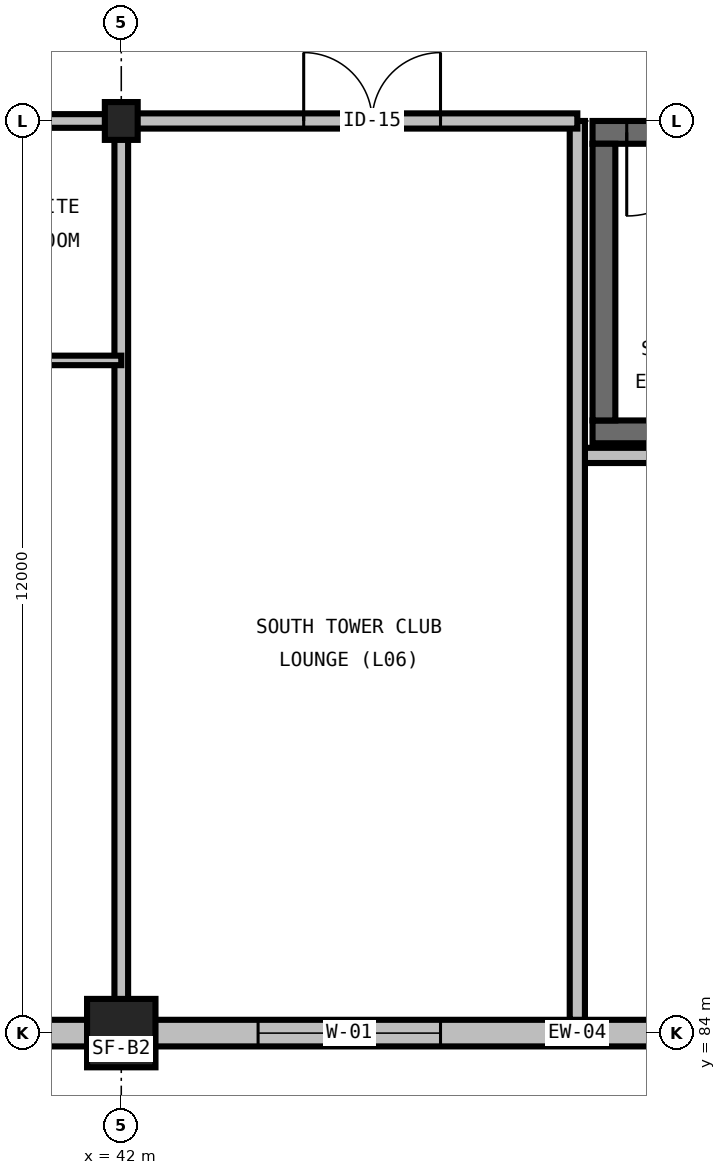
"""IFC4 building model, lengths in metres.
Left out: names, types, materials, properties, quantities, classifications, styles, units other than length and angle.
Written with IfcOpenShell. Run it as: python <this file> out.ifc"""

import sys

from ifc_helpers import new_model, si_unit, direction, frame, frame_2d, origin, origin_2d, place, context, subcontext, project, spatial, rectangle, i_section, extrude, element, fill, save


model = new_model("IFC4")
c1 = context("Model", 3, precision=1e-05, world=origin(), true_north=direction((0.0, 1.0)))
c2 = subcontext(c1, "Body", "Model", "MODEL_VIEW")
j1 = project(units=[si_unit("LENGTHUNIT", "METRE"), si_unit("PLANEANGLEUNIT", "RADIAN")], contexts=[c1])
p1 = place(None, origin())
s1 = spatial("IfcSite", under=j1, at=p1, CompositionType="ELEMENT")
p2 = place(p1, origin())
s2 = spatial("IfcBuilding", under=s1, at=p2, CompositionType="ELEMENT")
p3 = place(p2, frame((0.0, 0.0, 31.2)))
s3 = spatial("IfcBuildingStorey", under=s2, at=p3, CompositionType="ELEMENT", Elevation=31.2)
p4 = place(p3, frame((42.0, 84.0, 0.0), z_axis=(0.0, 0.0, 1.0), x_axis=(1.0, 0.0, 0.0)))
e1 = element("IfcColumn", 1, at=p4, inside=s3, PredefinedType="COLUMN", context=c2, shape_type="SweptSolid", body=[
    extrude(rectangle(XDim=0.9, YDim=0.9, at=origin_2d()), origin(), (0.0, 0.0, 1.0), 3.6),
])
p5 = place(p3, frame((42.0, 96.0, 0.0), z_axis=(0.0, 0.0, 1.0), x_axis=(1.0, 0.0, 0.0)))
e2 = element("IfcColumn", 2, at=p5, inside=s3, PredefinedType="COLUMN", context=c2, shape_type="SweptSolid", body=[
    extrude(i_section(OverallWidth=0.432, OverallDepth=0.498, WebThickness=0.056, FlangeThickness=0.089, FilletRadius=0.031, at=origin_2d()), origin(), (0.0, 0.0, 1.0), 3.6),
])
p6 = place(p3, frame((48.2, 91.91, 0.0), z_axis=(0.0, 0.0, 1.0), x_axis=(1.0, 0.0, 0.0)))
e3 = element("IfcWall", 3, at=p6, inside=s3, PredefinedType="SHEAR", context=c2, shape_type="SweptSolid", body=[
    extrude(rectangle(XDim=9.8, YDim=0.3, at=frame_2d((4.9, 0.0))), origin(), (0.0, 0.0, 1.0), 3.6),
])
p7 = place(p3, frame((58.0, 95.85, 0.0), z_axis=(0.0, 0.0, 1.0), x_axis=(-1.0, 0.0, 0.0)))
e4 = element("IfcWall", 4, at=p7, inside=s3, PredefinedType="SHEAR", context=c2, shape_type="SweptSolid", body=[
    extrude(rectangle(XDim=9.8, YDim=0.3, at=frame_2d((4.9, 0.0))), origin(), (0.0, 0.0, 1.0), 3.6),
])
p8 = place(p7, frame((8.25, 0.0, 0.0)))
e5 = element("IfcOpeningElement", 5, at=p8, cuts=e4, PredefinedType="OPENING", context=c2, shape_type="SweptSolid", body=[
    extrude(rectangle(XDim=1.1, YDim=2.2, at=frame_2d((0.55, 1.1))), frame((0.0, 0.165, 0.0), z_axis=(0.0, -1.0, 0.0), x_axis=(1.0, 0.0, 0.0)), (0.0, 0.0, 1.0), 0.33),
])
p9 = place(p3, frame((48.35, 95.7, 0.0), z_axis=(0.0, 0.0, 1.0), x_axis=(0.0, -1.0, 0.0)))
e6 = element("IfcWall", 6, at=p9, inside=s3, PredefinedType="SHEAR", context=c2, shape_type="SweptSolid", body=[
    extrude(rectangle(XDim=3.64, YDim=0.3, at=frame_2d((1.82, 0.0))), origin(), (0.0, 0.0, 1.0), 3.6),
])
p10 = place(p3, frame((36.0, 84.0, 0.0), z_axis=(0.0, 0.0, 1.0), x_axis=(1.0, 0.0, 0.0)))
e7 = element("IfcWall", 7, at=p10, inside=s3, PredefinedType="STANDARD", context=c2, shape_type="SweptSolid", body=[
    extrude(rectangle(XDim=6.0, YDim=0.35, at=frame_2d((3.0, 0.0))), origin(), (0.0, 0.0, 1.0), 2.486),
])
p11 = place(p10, frame((1.8, 0.0, 0.75)))
e8 = element("IfcOpeningElement", 8, at=p11, cuts=e7, PredefinedType="OPENING", context=c2, shape_type="SweptSolid", body=[
    extrude(rectangle(XDim=2.4, YDim=1.65, at=frame_2d((1.2, 0.825))), frame((0.0, 0.19, 0.0), z_axis=(0.0, -1.0, 0.0), x_axis=(1.0, 0.0, 0.0)), (0.0, 0.0, 1.0), 0.38),
])
p12 = place(p3, frame((42.0, 84.0, 0.0), z_axis=(0.0, 0.0, 1.0), x_axis=(1.0, 0.0, 0.0)))
e9 = element("IfcWall", 9, at=p12, inside=s3, PredefinedType="STANDARD", context=c2, shape_type="SweptSolid", body=[
    extrude(rectangle(XDim=12.0, YDim=0.35, at=frame_2d((6.0, 0.0))), origin(), (0.0, 0.0, 1.0), 2.486),
])
p13 = place(p12, frame((1.8, 0.0, 0.75)))
e10 = element("IfcOpeningElement", 10, at=p13, cuts=e9, PredefinedType="OPENING", context=c2, shape_type="SweptSolid", body=[
    extrude(rectangle(XDim=2.4, YDim=1.65, at=frame_2d((1.2, 0.825))), frame((0.0, 0.19, 0.0), z_axis=(0.0, -1.0, 0.0), x_axis=(1.0, 0.0, 0.0)), (0.0, 0.0, 1.0), 0.38),
])
p14 = place(p12, frame((7.725, 0.0, 0.75)))
e11 = element("IfcOpeningElement", 11, at=p14, cuts=e9, PredefinedType="OPENING", context=c2, shape_type="SweptSolid", body=[
    extrude(rectangle(XDim=2.55, YDim=1.65, at=frame_2d((1.275, 0.825))), frame((0.0, 0.19, 0.0), z_axis=(0.0, -1.0, 0.0), x_axis=(1.0, 0.0, 0.0)), (0.0, 0.0, 1.0), 0.38),
])
p15 = place(p3, frame((48.0, 91.6, 0.0), z_axis=(0.0, 0.0, 1.0), x_axis=(1.0, 0.0, 0.0)))
e12 = element("IfcWall", 12, at=p15, inside=s3, PredefinedType="PARTITIONING", context=c2, shape_type="SweptSolid", body=[
    extrude(rectangle(XDim=10.4, YDim=0.2, at=frame_2d((5.2, 0.0))), origin(), (0.0, 0.0, 1.0), 3.29),
])
p16 = place(p3, frame((48.0, 84.175, 0.0), z_axis=(0.0, 0.0, 1.0), x_axis=(0.0, 1.0, 0.0)))
e13 = element("IfcWall", 13, at=p16, inside=s3, PredefinedType="PARTITIONING", context=c2, shape_type="SweptSolid", body=[
    extrude(rectangle(XDim=11.825, YDim=0.2, at=frame_2d((5.913, 0.0))), origin(), (0.0, 0.0, 1.0), 3.29),
])
p17 = place(p3, frame((42.0, 96.0, 0.0), z_axis=(0.0, 0.0, 1.0), x_axis=(1.0, 0.0, 0.0)))
e14 = element("IfcWall", 14, at=p17, inside=s3, PredefinedType="PARTITIONING", context=c2, shape_type="SweptSolid", body=[
    extrude(rectangle(XDim=6.0, YDim=0.2, at=frame_2d((3.0, 0.0))), origin(), (0.0, 0.0, 1.0), 2.359),
])
p18 = place(p17, frame((2.4, 0.0, 0.0)))
e15 = element("IfcOpeningElement", 15, at=p18, cuts=e14, PredefinedType="OPENING", context=c2, shape_type="SweptSolid", body=[
    extrude(rectangle(XDim=1.8, YDim=2.3, at=frame_2d((0.9, 1.15))), frame((0.0, 0.115, 0.0), z_axis=(0.0, -1.0, 0.0), x_axis=(1.0, 0.0, 0.0)), (0.0, 0.0, 1.0), 0.23),
])
p19 = place(p3, frame((42.0, 84.175, 0.0), z_axis=(0.0, 0.0, 1.0), x_axis=(0.0, 1.0, 0.0)))
e16 = element("IfcWall", 16, at=p19, inside=s3, PredefinedType="PARTITIONING", context=c2, shape_type="SweptSolid", body=[
    extrude(rectangle(XDim=11.825, YDim=0.18, at=frame_2d((5.913, 0.0))), origin(), (0.0, 0.0, 1.0), 2.59),
])
p20 = place(p3, frame((36.0, 96.0, 0.0), z_axis=(0.0, 0.0, 1.0), x_axis=(1.0, 0.0, 0.0)))
e17 = element("IfcWall", 17, at=p20, inside=s3, PredefinedType="PARTITIONING", context=c2, shape_type="SweptSolid", body=[
    extrude(rectangle(XDim=6.0, YDim=0.18, at=frame_2d((3.0, 0.0))), origin(), (0.0, 0.0, 1.0), 2.736),
])
p21 = place(p20, frame((0.77, 0.0, 0.0)))
e18 = element("IfcOpeningElement", 18, at=p21, cuts=e17, PredefinedType="OPENING", context=c2, shape_type="SweptSolid", body=[
    extrude(rectangle(XDim=1.0, YDim=2.15, at=frame_2d((0.5, 1.075))), frame((0.0, 0.105, 0.0), z_axis=(0.0, -1.0, 0.0), x_axis=(1.0, 0.0, 0.0)), (0.0, 0.0, 1.0), 0.21),
])
p22 = place(p3, frame((39.48, 92.85, 0.0), z_axis=(0.0, 0.0, 1.0), x_axis=(1.0, 0.0, 0.0)))
e19 = element("IfcWall", 19, at=p22, inside=s3, PredefinedType="PARTITIONING", context=c2, shape_type="SweptSolid", body=[
    extrude(rectangle(XDim=2.52, YDim=0.125, at=frame_2d((1.26, 0.0))), origin(), (0.0, 0.0, 1.0), 3.29),
])
p23 = place(p8, origin())
e20 = element("IfcDoor", 20, at=p23, inside=s3, OperationType="SINGLE_SWING_RIGHT", PredefinedType="DOOR", context=c2, shape_type="SweptSolid", body=[
    extrude(rectangle(XDim=1.1, YDim=2.2, at=frame_2d((0.55, 1.1))), frame((0.0, 0.025, 0.0), z_axis=(0.0, -1.0, 0.0), x_axis=(1.0, 0.0, 0.0)), (0.0, 0.0, 1.0), 0.05),
])
fill(e5, e20)
p24 = place(p13, origin())
e21 = element("IfcWindow", 21, at=p24, inside=s3, PartitioningType="DOUBLE_PANEL_VERTICAL", PredefinedType="WINDOW", context=c2, shape_type="SweptSolid", body=[
    extrude(rectangle(XDim=2.4, YDim=1.65, at=frame_2d((1.2, 0.825))), frame((0.0, 0.03, 0.0), z_axis=(0.0, -1.0, 0.0), x_axis=(1.0, 0.0, 0.0)), (0.0, 0.0, 1.0), 0.06),
])
fill(e10, e21)
p25 = place(p18, origin())
e22 = element("IfcDoor", 22, at=p25, inside=s3, OperationType="DOUBLE_DOOR_SINGLE_SWING", PredefinedType="DOOR", context=c2, shape_type="SweptSolid", body=[
    extrude(rectangle(XDim=1.8, YDim=2.3, at=frame_2d((0.9, 1.15))), frame((0.0, 0.025, 0.0), z_axis=(0.0, -1.0, 0.0), x_axis=(1.0, 0.0, 0.0)), (0.0, 0.0, 1.0), 0.05),
])
fill(e15, e22)
save(model, sys.argv[1])
